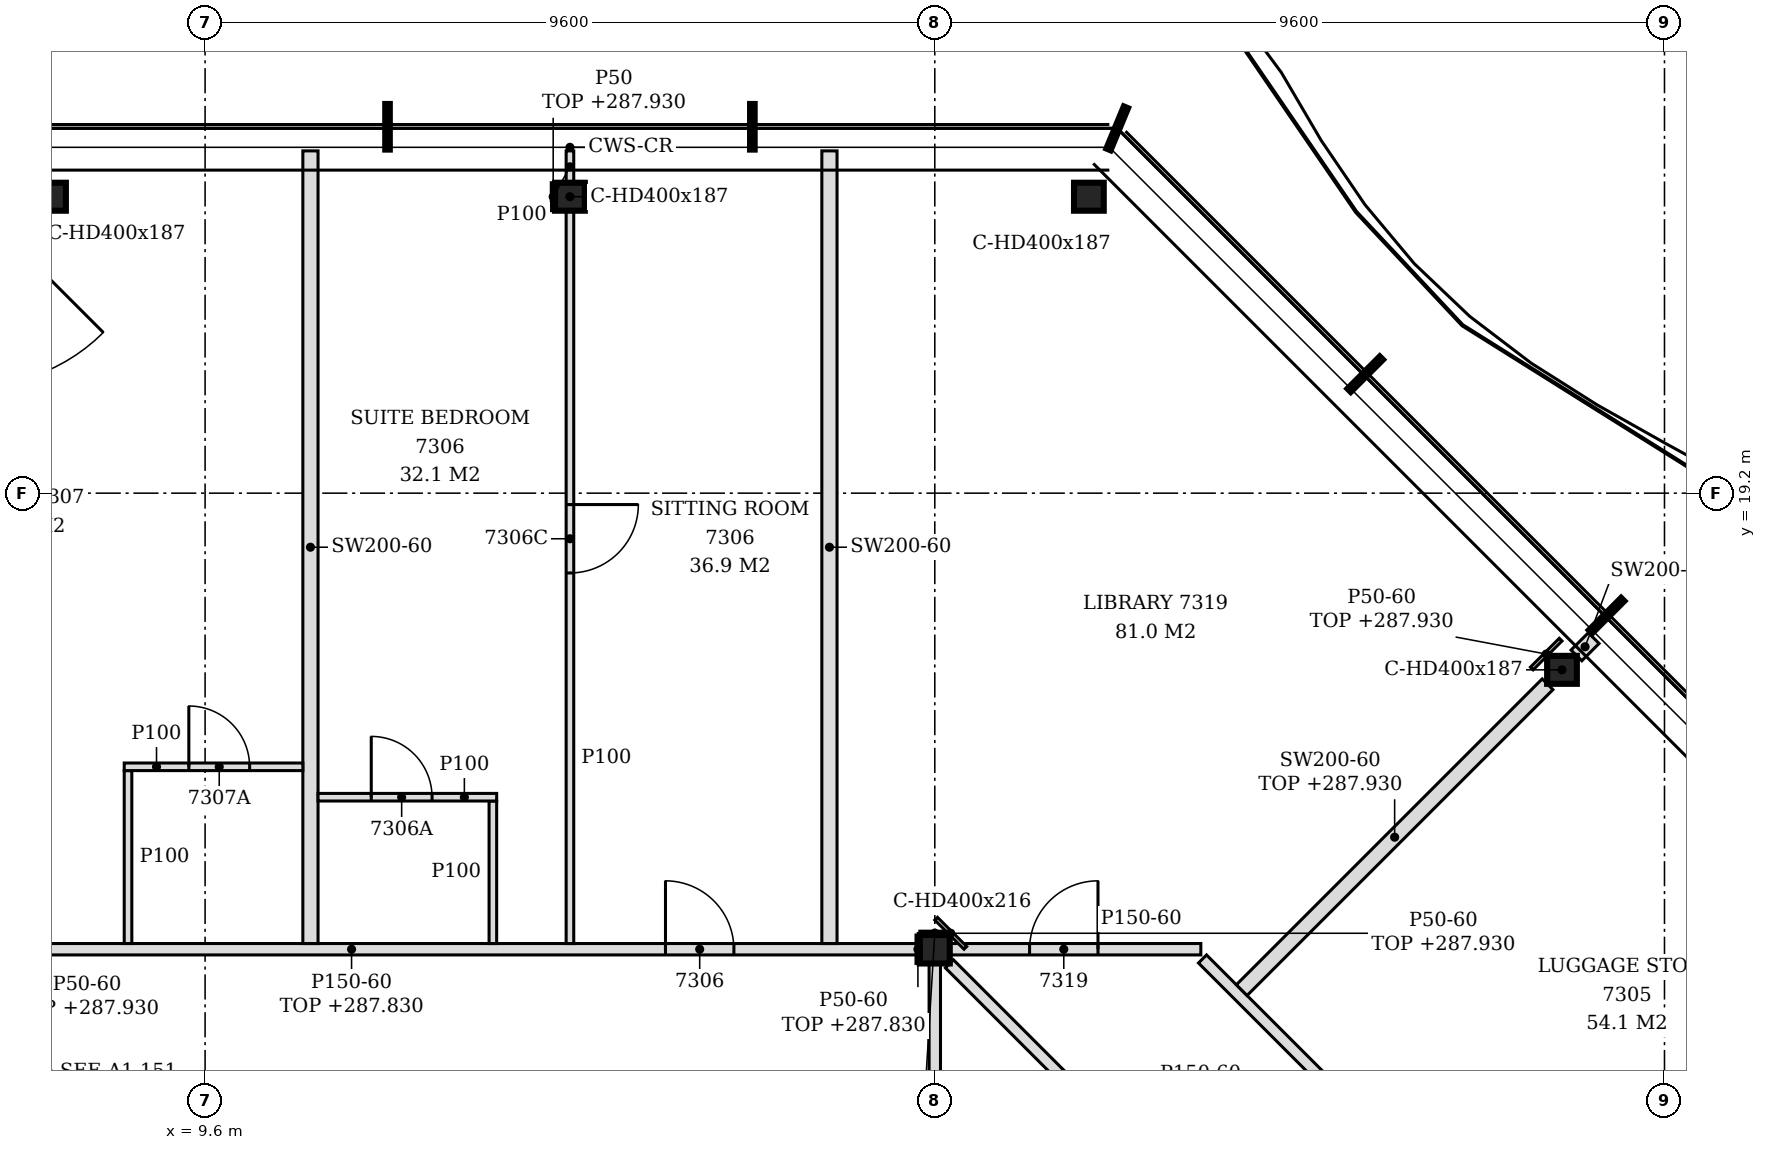
"""IFC4 building model, lengths in metres.
Left out: names, types, materials, properties, quantities, classifications, styles, units other than length and angle.
Written with IfcOpenShell. Run it as: python <this file> out.ifc"""

import sys

from ifc_helpers import new_model, si_unit, direction, frame, frame_2d, origin, origin_2d, place, context, subcontext, project, spatial, polyline, rectangle, i_section, outline, extrude, element, fill, save


model = new_model("IFC4")
c1 = context("Model", 3, precision=1e-05, world=origin(), true_north=direction((0.0, 1.0)))
c2 = subcontext(c1, "Body", "Model", "MODEL_VIEW")
j1 = project(units=[si_unit("LENGTHUNIT", "METRE"), si_unit("PLANEANGLEUNIT", "RADIAN")], contexts=[c1])
p1 = place(None, origin())
s1 = spatial("IfcSite", under=j1, at=p1, CompositionType="ELEMENT")
p2 = place(p1, origin())
s2 = spatial("IfcBuilding", under=s1, at=p2, CompositionType="ELEMENT")
p3 = place(p2, frame((0.0, 0.0, 285.0)))
s3 = spatial("IfcBuildingStorey", under=s2, at=p3, CompositionType="ELEMENT", Elevation=285.0)
for number, where, z_axis, x_axis in (
    (1, (27.451, 16.876, -0.15), (0.0, 0.0, 1.0), (1.0, 0.0, 0.0)),
    (2, (21.227, 23.1, -0.15), (0.0, 0.0, 1.0), (1.0, 0.0, 0.0)),
    (3, (14.4, 23.1, -0.15), (0.0, 0.0, 1.0), (1.0, 0.0, 0.0)),
    (4, (7.573, 23.1, -0.15), (0.0, 0.0, 1.0), (1.0, 0.0, 0.0)),
):
    element("IfcColumn", number, at=place(p3, frame(where, z_axis=z_axis, x_axis=x_axis)), inside=s3, PredefinedType="COLUMN", context=c2, shape_type="SweptSolid", body=[
        extrude(i_section(OverallWidth=0.391, OverallDepth=0.368, WebThickness=0.015, FlangeThickness=0.024, FilletRadius=0.015, at=origin_2d()), origin(), (0.0, 0.0, 1.0), 3.6),
    ])
p4 = place(p3, frame((19.2, 13.2, -0.15), z_axis=(0.0, 0.0, 1.0), x_axis=(1.0, 0.0, 0.0)))
e5 = element("IfcColumn", 5, at=p4, inside=s3, PredefinedType="COLUMN", context=c2, shape_type="SweptSolid", body=[
    extrude(i_section(OverallWidth=0.394, OverallDepth=0.375, WebThickness=0.017, FlangeThickness=0.028, FilletRadius=0.015, at=origin_2d()), origin(), (0.0, 0.0, 1.0), 3.6),
])
p5 = place(p3, frame((29.947, 2.453, 0.0), z_axis=(0.0, 0.0, 1.0), x_axis=(-0.707098603185, 0.707114959093, 0.0)))
e6 = element("IfcWall", 6, at=p5, inside=s3, PredefinedType="PARTITIONING", context=c2, shape_type="SweptSolid", body=[
    extrude(rectangle(XDim=14.927, YDim=0.15, at=frame_2d((7.463, 0.0))), origin(), (0.0, 0.0, 1.0), 2.88),
])
p6 = place(p5, frame((1.325, 0.0, 0.0)))
e7 = element("IfcOpeningElement", 7, at=p6, cuts=e6, PredefinedType="OPENING", context=c2, shape_type="SweptSolid", body=[
    extrude(rectangle(XDim=0.8, YDim=2.1, at=frame_2d((0.4, 1.05))), frame((0.0, 0.085, 0.0), z_axis=(0.0, -1.0, 0.0), x_axis=(1.0, 0.0, 0.0)), (0.0, 0.0, 1.0), 0.17),
])
p7 = place(p5, frame((4.476, 0.0, 0.0)))
e8 = element("IfcOpeningElement", 8, at=p7, cuts=e6, PredefinedType="OPENING", context=c2, shape_type="SweptSolid", body=[
    extrude(rectangle(XDim=0.8, YDim=2.1, at=frame_2d((0.4, 1.05))), frame((0.0, 0.085, 0.0), z_axis=(0.0, -1.0, 0.0), x_axis=(1.0, 0.0, 0.0)), (0.0, 0.0, 1.0), 0.17),
])
p8 = place(p5, frame((7.175, 0.0, 0.0)))
e9 = element("IfcOpeningElement", 9, at=p8, cuts=e6, PredefinedType="OPENING", context=c2, shape_type="SweptSolid", body=[
    extrude(rectangle(XDim=0.8, YDim=2.1, at=frame_2d((0.4, 1.05))), frame((0.0, 0.085, 0.0), z_axis=(0.0, -1.0, 0.0), x_axis=(1.0, 0.0, 0.0)), (0.0, 0.0, 1.0), 0.17),
])
p9 = place(p3, frame((19.2, 2.587, 0.0), z_axis=(0.0, 0.0, 1.0), x_axis=(0.0, 1.0, 0.0)))
e10 = element("IfcWall", 10, at=p9, inside=s3, PredefinedType="PARTITIONING", context=c2, shape_type="SweptSolid", body=[
    extrude(rectangle(XDim=10.425, YDim=0.15, at=frame_2d((5.212, 0.0))), origin(), (0.0, 0.0, 1.0), 2.83),
])
p10 = place(p9, frame((2.962, 0.0, 0.0)))
e11 = element("IfcOpeningElement", 11, at=p10, cuts=e10, PredefinedType="OPENING", context=c2, shape_type="SweptSolid", body=[
    extrude(rectangle(XDim=0.9, YDim=2.1, at=frame_2d((0.45, 1.05))), frame((0.0, 0.085, 0.0), z_axis=(0.0, -1.0, 0.0), x_axis=(1.0, 0.0, 0.0)), (0.0, 0.0, 1.0), 0.17),
])
p11 = place(p3, frame((32.272, 3.522, 0.0), z_axis=(0.0, 0.0, 1.0), x_axis=(-0.707097742657, 0.707115819601, 0.0)))
e12 = element("IfcWall", 12, at=p11, inside=s3, PredefinedType="PARTITIONING", context=c2, shape_type="SweptSolid", body=[
    extrude(rectangle(XDim=13.506, YDim=0.15, at=frame_2d((6.753, 0.0))), origin(), (0.0, 0.0, 1.0), 2.88),
])
p12 = place(p11, frame((1.538, 0.0, 0.0)))
e13 = element("IfcOpeningElement", 13, at=p12, cuts=e12, PredefinedType="OPENING", context=c2, shape_type="SweptSolid", body=[
    extrude(rectangle(XDim=1.8, YDim=2.1, at=frame_2d((0.9, 1.05))), frame((0.0, 0.085, 0.0), z_axis=(0.0, -1.0, 0.0), x_axis=(1.0, 0.0, 0.0)), (0.0, 0.0, 1.0), 0.17),
])
p13 = place(p11, frame((8.503, 0.0, 0.0)))
e14 = element("IfcOpeningElement", 14, at=p13, cuts=e12, PredefinedType="OPENING", context=c2, shape_type="SweptSolid", body=[
    extrude(rectangle(XDim=0.9, YDim=2.1, at=frame_2d((0.45, 1.05))), frame((0.0, 0.085, 0.0), z_axis=(0.0, -1.0, 0.0), x_axis=(1.0, 0.0, 0.0)), (0.0, 0.0, 1.0), 0.17),
])
p14 = place(p3, frame((23.238, 12.662, 0.0), z_axis=(0.0, 0.0, 1.0), x_axis=(0.707106781187, 0.707106781187, 0.0)))
e15 = element("IfcWall", 15, at=p14, inside=s3, PredefinedType="PARTITIONING", context=c2, shape_type="SweptSolid", body=[
    extrude(rectangle(XDim=5.69, YDim=0.2, at=frame_2d((2.845, 0.0))), origin(), (0.0, 0.0, 1.0), 2.93),
])
p15 = place(p3, frame((7.397, 13.2, 0.0), z_axis=(0.0, 0.0, 1.0), x_axis=(1.0, 0.0, 0.0)))
e16 = element("IfcWall", 16, at=p15, inside=s3, PredefinedType="PARTITIONING", context=c2, shape_type="SweptSolid", body=[
    extrude(rectangle(XDim=11.606, YDim=0.15, at=frame_2d((5.803, 0.0))), origin(), (0.0, 0.0, 1.0), 2.83),
])
p16 = place(p15, frame((8.26, 0.0, 0.0)))
e17 = element("IfcOpeningElement", 17, at=p16, cuts=e16, PredefinedType="OPENING", context=c2, shape_type="SweptSolid", body=[
    extrude(rectangle(XDim=0.9, YDim=2.1, at=frame_2d((0.45, 1.05))), frame((0.0, 0.085, 0.0), z_axis=(0.0, -1.0, 0.0), x_axis=(1.0, 0.0, 0.0)), (0.0, 0.0, 1.0), 0.17),
])
p17 = place(p3, frame((19.397, 13.2, 0.0), z_axis=(0.0, 0.0, 1.0), x_axis=(1.0, 0.0, 0.0)))
e18 = element("IfcWall", 18, at=p17, inside=s3, PredefinedType="PARTITIONING", context=c2, shape_type="SweptSolid", body=[
    extrude(rectangle(XDim=3.303, YDim=0.15, at=frame_2d((1.652, 0.0))), origin(), (0.0, 0.0, 1.0), 3.45),
])
p18 = place(p17, frame((1.05, 0.0, 0.0)))
e19 = element("IfcOpeningElement", 19, at=p18, cuts=e18, PredefinedType="OPENING", context=c2, shape_type="SweptSolid", body=[
    extrude(rectangle(XDim=0.9, YDim=2.1, at=frame_2d((0.45, 1.05))), frame((0.0, 0.085, 0.0), z_axis=(0.0, -1.0, 0.0), x_axis=(1.0, 0.0, 0.0)), (0.0, 0.0, 1.0), 0.17),
])
p19 = place(p3, frame((8.586, 13.275, 0.0), z_axis=(0.0, 0.0, 1.0), x_axis=(0.0, 1.0, 0.0)))
e20 = element("IfcWall", 20, at=p19, inside=s3, PredefinedType="PARTITIONING", context=c2, shape_type="SweptSolid", body=[
    extrude(outline(polyline([(0.0, 0.0), (2.275, 0.0), (2.275, 3.45), (0.075, 3.45), (0.073, 2.83), (0.0, 2.83), (0.0, 0.0)])), frame((0.0, 0.05, 0.0), z_axis=(0.0, -1.0, 0.0), x_axis=(1.0, 0.0, 0.0)), (0.0, 0.0, 1.0), 0.1),
])
p20 = place(p3, frame((10.986, 13.275, 0.0), z_axis=(0.0, 0.0, 1.0), x_axis=(0.0, 1.0, 0.0)))
e21 = element("IfcWall", 21, at=p20, inside=s3, PredefinedType="PARTITIONING", context=c2, shape_type="SweptSolid", body=[
    extrude(outline(polyline([(0.0, 0.0), (10.428, 0.0), (10.428, 3.45), (9.975, 3.45), (9.973, 2.93), (9.675, 2.93), (9.673, 3.45), (6.03, 3.45), (6.028, 2.88), (5.82, 2.88), (5.818, 3.45), (0.075, 3.45), (0.073, 2.83), (0.0, 2.83), (0.0, 0.0)])), frame((0.0, 0.1, 0.0), z_axis=(0.0, -1.0, 0.0), x_axis=(1.0, 0.0, 0.0)), (0.0, 0.0, 1.0), 0.2),
])
p21 = place(p3, frame((13.386, 13.275, 0.0), z_axis=(0.0, 0.0, 1.0), x_axis=(0.0, 1.0, 0.0)))
e22 = element("IfcWall", 22, at=p21, inside=s3, PredefinedType="PARTITIONING", context=c2, shape_type="SweptSolid", body=[
    extrude(outline(polyline([(0.0, 0.0), (1.875, 0.0), (1.875, 3.45), (0.075, 3.45), (0.073, 2.83), (0.0, 2.83), (0.0, 0.0)])), frame((0.0, 0.05, 0.0), z_axis=(0.0, -1.0, 0.0), x_axis=(1.0, 0.0, 0.0)), (0.0, 0.0, 1.0), 0.1),
])
p22 = place(p3, frame((14.4, 13.275, 0.0), z_axis=(0.0, 0.0, 1.0), x_axis=(0.0, 1.0, 0.0)))
e23 = element("IfcWall", 23, at=p22, inside=s3, PredefinedType="PARTITIONING", context=c2, shape_type="SweptSolid", body=[
    extrude(outline(polyline([(0.0, 0.0), (9.641, 0.0), (9.641, 3.45), (6.03, 3.45), (6.028, 2.88), (5.82, 2.88), (5.818, 3.45), (0.075, 3.45), (0.073, 2.83), (0.0, 2.83), (0.0, 0.0)])), frame((0.0, 0.05, 0.0), z_axis=(0.0, -1.0, 0.0), x_axis=(1.0, 0.0, 0.0)), (0.0, 0.0, 1.0), 0.1),
])
p23 = place(p22, frame((4.875, 0.0, 0.0)))
e24 = element("IfcOpeningElement", 24, at=p23, cuts=e23, PredefinedType="OPENING", context=c2, shape_type="SweptSolid", body=[
    extrude(rectangle(XDim=0.9, YDim=2.1, at=frame_2d((0.45, 1.05))), frame((0.0, 0.06, 0.0), z_axis=(0.0, -1.0, 0.0), x_axis=(1.0, 0.0, 0.0)), (0.0, 0.0, 1.0), 0.12),
])
p24 = place(p3, frame((17.814, 13.275, 0.0), z_axis=(0.0, 0.0, 1.0), x_axis=(0.0, 1.0, 0.0)))
e25 = element("IfcWall", 25, at=p24, inside=s3, PredefinedType="PARTITIONING", context=c2, shape_type="SweptSolid", body=[
    extrude(outline(polyline([(0.0, 0.0), (10.428, 0.0), (10.428, 3.45), (9.975, 3.45), (9.973, 2.93), (9.675, 2.93), (9.673, 3.45), (6.03, 3.45), (6.028, 2.88), (5.82, 2.88), (5.818, 3.45), (0.075, 3.45), (0.073, 2.83), (0.0, 2.83), (0.0, 0.0)])), frame((0.0, 0.1, 0.0), z_axis=(0.0, -1.0, 0.0), x_axis=(1.0, 0.0, 0.0)), (0.0, 0.0, 1.0), 0.2),
])
p25 = place(p3, frame((11.086, 15.2, 0.0), z_axis=(0.0, 0.0, 1.0), x_axis=(1.0, 0.0, 0.0)))
e26 = element("IfcWall", 26, at=p25, inside=s3, PredefinedType="PARTITIONING", context=c2, shape_type="SweptSolid", body=[
    extrude(rectangle(XDim=2.35, YDim=0.1, at=frame_2d((1.175, 0.0))), origin(), (0.0, 0.0, 1.0), 3.45),
])
p26 = place(p25, frame((0.7, 0.0, 0.0)))
e27 = element("IfcOpeningElement", 27, at=p26, cuts=e26, PredefinedType="OPENING", context=c2, shape_type="SweptSolid", body=[
    extrude(rectangle(XDim=0.8, YDim=2.1, at=frame_2d((0.4, 1.05))), frame((0.0, 0.06, 0.0), z_axis=(0.0, -1.0, 0.0), x_axis=(1.0, 0.0, 0.0)), (0.0, 0.0, 1.0), 0.12),
])
p27 = place(p3, frame((8.536, 15.6, 0.0), z_axis=(0.0, 0.0, 1.0), x_axis=(1.0, 0.0, 0.0)))
e28 = element("IfcWall", 28, at=p27, inside=s3, PredefinedType="PARTITIONING", context=c2, shape_type="SweptSolid", body=[
    extrude(rectangle(XDim=2.35, YDim=0.1, at=frame_2d((1.175, 0.0))), origin(), (0.0, 0.0, 1.0), 3.45),
])
p28 = place(p27, frame((0.85, 0.0, 0.0)))
e29 = element("IfcOpeningElement", 29, at=p28, cuts=e28, PredefinedType="OPENING", context=c2, shape_type="SweptSolid", body=[
    extrude(rectangle(XDim=0.8, YDim=2.1, at=frame_2d((0.4, 1.05))), frame((0.0, 0.06, 0.0), z_axis=(0.0, -1.0, 0.0), x_axis=(1.0, 0.0, 0.0)), (0.0, 0.0, 1.0), 0.12),
])
p29 = place(p3, frame((27.641, 17.065, 0.0), z_axis=(0.0, 0.0, 1.0), x_axis=(0.707106781187, 0.707106781187, 0.0)))
e30 = element("IfcWall", 30, at=p29, inside=s3, PredefinedType="PARTITIONING", context=c2, shape_type="SweptSolid", body=[
    extrude(rectangle(XDim=0.322, YDim=0.2, at=frame_2d((0.161, 0.0))), origin(), (0.0, 0.0, 1.0), 3.45),
])
p30 = place(p3, frame((14.4, 23.284, 0.0), z_axis=(0.0, 0.0, 1.0), x_axis=(0.0, 1.0, 0.0)))
e31 = element("IfcWall", 31, at=p30, inside=s3, PredefinedType="PARTITIONING", context=c2, shape_type="SweptSolid", body=[
    extrude(rectangle(XDim=0.419, YDim=0.1, at=frame_2d((0.209, 0.0))), origin(), (0.0, 0.0, 1.0), 3.45),
])
p31 = place(p3, frame((18.978, 13.012, 0.0), z_axis=(0.0, 0.0, 1.0), x_axis=(0.0, 1.0, 0.0)))
e32 = element("IfcWall", 32, at=p31, inside=s3, PredefinedType="PARTITIONING", context=c2, shape_type="SweptSolid", body=[
    extrude(rectangle(XDim=0.375, YDim=0.05, at=frame_2d((0.188, 0.0))), origin(), (0.0, 0.0, 1.0), 2.83),
])
p32 = place(p3, frame((19.602, 13.218, 0.0), z_axis=(0.0, 0.0, 1.0), x_axis=(-0.707106781187, 0.707106781187, 0.0)))
e33 = element("IfcWall", 33, at=p32, inside=s3, PredefinedType="PARTITIONING", context=c2, shape_type="SweptSolid", body=[
    extrude(rectangle(XDim=0.544, YDim=0.05, at=frame_2d((0.272, 0.0))), origin(), (0.0, 0.0, 1.0), 2.93),
])
p33 = place(p3, frame((27.054, 16.893, 0.0), z_axis=(0.0, 0.0, 1.0), x_axis=(0.707106781187, 0.707106781187, 0.0)))
e34 = element("IfcWall", 34, at=p33, inside=s3, PredefinedType="PARTITIONING", context=c2, shape_type="SweptSolid", body=[
    extrude(rectangle(XDim=0.537, YDim=0.05, at=frame_2d((0.269, 0.0))), origin(), (0.0, 0.0, 1.0), 2.93),
])
p34 = place(p3, frame((19.003, 13.413, 0.0), z_axis=(0.0, 0.0, 1.0), x_axis=(1.0, 0.0, 0.0)))
e35 = element("IfcWall", 35, at=p34, inside=s3, PredefinedType="PARTITIONING", context=c2, shape_type="SweptSolid", body=[
    extrude(rectangle(XDim=0.394, YDim=0.05, at=frame_2d((0.197, 0.0))), origin(), (0.0, 0.0, 1.0), 2.93),
])
p35 = place(p3, frame((14.179, 22.916, 0.0), z_axis=(0.0, 0.0, 1.0), x_axis=(0.0, 1.0, 0.0)))
e36 = element("IfcWall", 36, at=p35, inside=s3, PredefinedType="PARTITIONING", context=c2, shape_type="SweptSolid", body=[
    extrude(rectangle(XDim=0.368, YDim=0.05, at=frame_2d((0.184, 0.0))), origin(), (0.0, 0.0, 1.0), 2.93),
])
p36 = place(p16, origin())
e37 = element("IfcDoor", 37, at=p36, inside=s3, OperationType="SINGLE_SWING_LEFT", PredefinedType="DOOR", context=c2, shape_type="SweptSolid", body=[
    extrude(rectangle(XDim=0.9, YDim=2.1, at=frame_2d((0.45, 1.05))), frame((0.0, 0.025, 0.0), z_axis=(0.0, -1.0, 0.0), x_axis=(1.0, 0.0, 0.0)), (0.0, 0.0, 1.0), 0.05),
])
fill(e17, e37)
p37 = place(p23, frame((0.9, 0.0, 0.0), z_axis=(0.0, 0.0, 1.0), x_axis=(-1.0, 0.0, 0.0)))
e38 = element("IfcDoor", 38, at=p37, inside=s3, OperationType="SINGLE_SWING_LEFT", PredefinedType="DOOR", context=c2, shape_type="SweptSolid", body=[
    extrude(rectangle(XDim=0.9, YDim=2.1, at=frame_2d((0.45, 1.05))), frame((0.0, 0.025, 0.0), z_axis=(0.0, -1.0, 0.0), x_axis=(1.0, 0.0, 0.0)), (0.0, 0.0, 1.0), 0.05),
])
fill(e24, e38)
p38 = place(p26, origin())
e39 = element("IfcDoor", 39, at=p38, inside=s3, OperationType="SINGLE_SWING_LEFT", PredefinedType="DOOR", context=c2, shape_type="SweptSolid", body=[
    extrude(rectangle(XDim=0.8, YDim=2.1, at=frame_2d((0.4, 1.05))), frame((0.0, 0.025, 0.0), z_axis=(0.0, -1.0, 0.0), x_axis=(1.0, 0.0, 0.0)), (0.0, 0.0, 1.0), 0.05),
])
fill(e27, e39)
p39 = place(p28, origin())
e40 = element("IfcDoor", 40, at=p39, inside=s3, OperationType="SINGLE_SWING_LEFT", PredefinedType="DOOR", context=c2, shape_type="SweptSolid", body=[
    extrude(rectangle(XDim=0.8, YDim=2.1, at=frame_2d((0.4, 1.05))), frame((0.0, 0.025, 0.0), z_axis=(0.0, -1.0, 0.0), x_axis=(1.0, 0.0, 0.0)), (0.0, 0.0, 1.0), 0.05),
])
fill(e29, e40)
p40 = place(p18, origin())
e41 = element("IfcDoor", 41, at=p40, inside=s3, OperationType="SINGLE_SWING_RIGHT", PredefinedType="DOOR", context=c2, shape_type="SweptSolid", body=[
    extrude(rectangle(XDim=0.9, YDim=2.1, at=frame_2d((0.45, 1.05))), frame((0.0, 0.025, 0.0), z_axis=(0.0, -1.0, 0.0), x_axis=(1.0, 0.0, 0.0)), (0.0, 0.0, 1.0), 0.05),
])
fill(e19, e41)
save(model, sys.argv[1])
